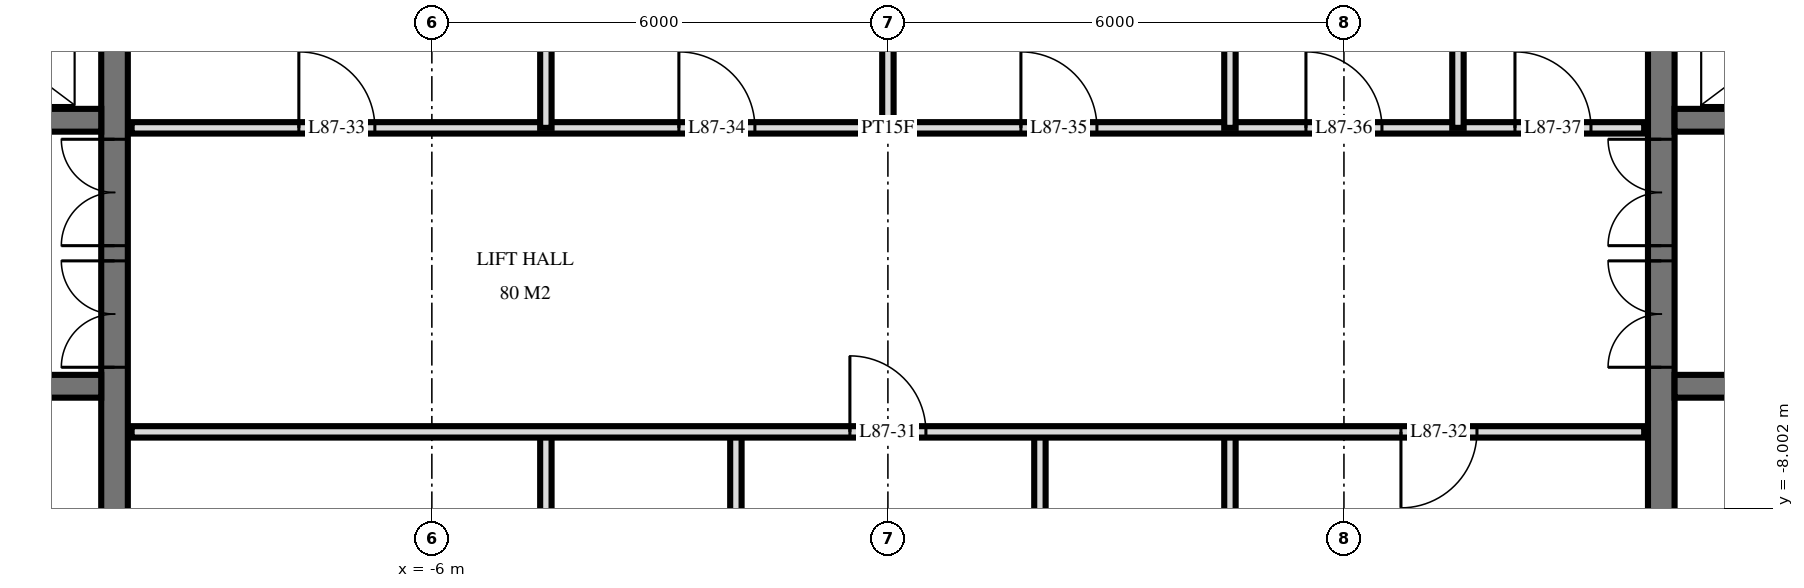
"""IFC4 building model, lengths in metres.
Left out: names, types, materials, properties, quantities, classifications, styles, units other than length and angle.
Written with IfcOpenShell. Run it as: python <this file> out.ifc"""

import sys

from ifc_helpers import new_model, si_unit, direction, frame, frame_2d, origin, place, context, subcontext, project, spatial, rectangle, extrude, element, fill, save


model = new_model("IFC4")
c1 = context("Model", 3, precision=1e-05, world=origin(), true_north=direction((0.0, 1.0)))
c2 = subcontext(c1, "Body", "Model", "MODEL_VIEW")
j1 = project(units=[si_unit("LENGTHUNIT", "METRE"), si_unit("PLANEANGLEUNIT", "RADIAN")], contexts=[c1])
p1 = place(None, origin())
s1 = spatial("IfcSite", under=j1, at=p1, CompositionType="ELEMENT")
p2 = place(p1, origin())
s2 = spatial("IfcBuilding", under=s1, at=p2, CompositionType="ELEMENT")
p3 = place(p2, frame((0.0, 0.0, 330.6)))
s3 = spatial("IfcBuildingStorey", under=s2, at=p3, CompositionType="ELEMENT", Elevation=330.6)
p4 = place(p3, frame((-10.175, -14.55, 0.0), z_axis=(0.0, 0.0, 1.0), x_axis=(0.0, 1.0, 0.0)))
e1 = element("IfcWall", 1, at=p4, inside=s3, PredefinedType="SHEAR", context=c2, shape_type="SweptSolid", body=[
    extrude(rectangle(XDim=14.1, YDim=0.35, at=frame_2d((7.05, 0.0))), origin(), (0.0, 0.0, 1.0), 4.0),
])
p5 = place(p4, frame((8.4, 0.0, 0.0)))
e2 = element("IfcOpeningElement", 2, at=p5, cuts=e1, PredefinedType="OPENING", context=c2, shape_type="SweptSolid", body=[
    extrude(rectangle(XDim=1.4, YDim=2.4, at=frame_2d((0.7, 1.2))), frame((0.0, 0.185, 0.0), z_axis=(0.0, -1.0, 0.0), x_axis=(1.0, 0.0, 0.0)), (0.0, 0.0, 1.0), 0.37),
])
p6 = place(p4, frame((10.0, 0.0, 0.0)))
e3 = element("IfcOpeningElement", 3, at=p6, cuts=e1, PredefinedType="OPENING", context=c2, shape_type="SweptSolid", body=[
    extrude(rectangle(XDim=1.4, YDim=2.4, at=frame_2d((0.7, 1.2))), frame((0.0, 0.185, 0.0), z_axis=(0.0, -1.0, 0.0), x_axis=(1.0, 0.0, 0.0)), (0.0, 0.0, 1.0), 0.37),
])
p7 = place(p4, frame((4.0, 0.0, 0.0)))
e4 = element("IfcOpeningElement", 4, at=p7, cuts=e1, PredefinedType="OPENING", context=c2, shape_type="SweptSolid", body=[
    extrude(rectangle(XDim=1.2, YDim=2.1, at=frame_2d((0.6, 1.05))), frame((0.0, 0.185, 0.0), z_axis=(0.0, -1.0, 0.0), x_axis=(1.0, 0.0, 0.0)), (0.0, 0.0, 1.0), 0.37),
])
p8 = place(p3, frame((-19.05, -2.9, 0.0), z_axis=(0.0, 0.0, 1.0), x_axis=(1.0, 0.0, 0.0)))
e5 = element("IfcWall", 5, at=p8, inside=s3, PredefinedType="SHEAR", context=c2, shape_type="SweptSolid", body=[
    extrude(rectangle(XDim=8.7, YDim=0.3, at=frame_2d((4.35, 0.0))), origin(), (0.0, 0.0, 1.0), 4.0),
])
p9 = place(p8, frame((6.8, 0.0, 0.0)))
e6 = element("IfcOpeningElement", 6, at=p9, cuts=e5, PredefinedType="OPENING", context=c2, shape_type="SweptSolid", body=[
    extrude(rectangle(XDim=1.1, YDim=2.1, at=frame_2d((0.55, 1.05))), frame((0.0, 0.16, 0.0), z_axis=(0.0, -1.0, 0.0), x_axis=(1.0, 0.0, 0.0)), (0.0, 0.0, 1.0), 0.32),
])
p10 = place(p8, frame((3.8, 0.0, 0.0)))
e7 = element("IfcOpeningElement", 7, at=p10, cuts=e5, PredefinedType="OPENING", context=c2, shape_type="SweptSolid", body=[
    extrude(rectangle(XDim=1.1, YDim=2.1, at=frame_2d((0.55, 1.05))), frame((0.0, 0.16, 0.0), z_axis=(0.0, -1.0, 0.0), x_axis=(1.0, 0.0, 0.0)), (0.0, 0.0, 1.0), 0.32),
])
p11 = place(p8, frame((1.613, 0.0, 0.0)))
e8 = element("IfcOpeningElement", 8, at=p11, cuts=e5, PredefinedType="OPENING", context=c2, shape_type="SweptSolid", body=[
    extrude(rectangle(XDim=0.9, YDim=2.1, at=frame_2d((0.45, 1.05))), frame((0.0, 0.16, 0.0), z_axis=(0.0, -1.0, 0.0), x_axis=(1.0, 0.0, 0.0)), (0.0, 0.0, 1.0), 0.32),
])
p12 = place(p8, frame((0.188, 0.0, 0.0)))
e9 = element("IfcOpeningElement", 9, at=p12, cuts=e5, PredefinedType="OPENING", context=c2, shape_type="SweptSolid", body=[
    extrude(rectangle(XDim=0.9, YDim=2.1, at=frame_2d((0.45, 1.05))), frame((0.0, 0.16, 0.0), z_axis=(0.0, -1.0, 0.0), x_axis=(1.0, 0.0, 0.0)), (0.0, 0.0, 1.0), 0.32),
])
p13 = place(p3, frame((-19.05, -6.4, 0.0), z_axis=(0.0, 0.0, 1.0), x_axis=(1.0, 0.0, 0.0)))
e10 = element("IfcWall", 10, at=p13, inside=s3, PredefinedType="SHEAR", context=c2, shape_type="SweptSolid", body=[
    extrude(rectangle(XDim=8.7, YDim=0.3, at=frame_2d((4.35, 0.0))), origin(), (0.0, 0.0, 1.0), 4.0),
])
p14 = place(p13, frame((0.8, 0.0, 0.0)))
e11 = element("IfcOpeningElement", 11, at=p14, cuts=e10, PredefinedType="OPENING", context=c2, shape_type="SweptSolid", body=[
    extrude(rectangle(XDim=1.1, YDim=2.1, at=frame_2d((0.55, 1.05))), frame((0.0, 0.16, 0.0), z_axis=(0.0, -1.0, 0.0), x_axis=(1.0, 0.0, 0.0)), (0.0, 0.0, 1.0), 0.32),
])
p15 = place(p3, frame((10.175, -14.55, 0.0), z_axis=(0.0, 0.0, 1.0), x_axis=(0.0, 1.0, 0.0)))
e12 = element("IfcWall", 12, at=p15, inside=s3, PredefinedType="SHEAR", context=c2, shape_type="SweptSolid", body=[
    extrude(rectangle(XDim=14.1, YDim=0.35, at=frame_2d((7.05, 0.0))), origin(), (0.0, 0.0, 1.0), 4.0),
])
p16 = place(p15, frame((8.4, 0.0, 0.0)))
e13 = element("IfcOpeningElement", 13, at=p16, cuts=e12, PredefinedType="OPENING", context=c2, shape_type="SweptSolid", body=[
    extrude(rectangle(XDim=1.4, YDim=2.4, at=frame_2d((0.7, 1.2))), frame((0.0, 0.185, 0.0), z_axis=(0.0, -1.0, 0.0), x_axis=(1.0, 0.0, 0.0)), (0.0, 0.0, 1.0), 0.37),
])
p17 = place(p15, frame((10.0, 0.0, 0.0)))
e14 = element("IfcOpeningElement", 14, at=p17, cuts=e12, PredefinedType="OPENING", context=c2, shape_type="SweptSolid", body=[
    extrude(rectangle(XDim=1.4, YDim=2.4, at=frame_2d((0.7, 1.2))), frame((0.0, 0.185, 0.0), z_axis=(0.0, -1.0, 0.0), x_axis=(1.0, 0.0, 0.0)), (0.0, 0.0, 1.0), 0.37),
])
p18 = place(p15, frame((4.0, 0.0, 0.0)))
e15 = element("IfcOpeningElement", 15, at=p18, cuts=e12, PredefinedType="OPENING", context=c2, shape_type="SweptSolid", body=[
    extrude(rectangle(XDim=1.2, YDim=2.1, at=frame_2d((0.6, 1.05))), frame((0.0, 0.185, 0.0), z_axis=(0.0, -1.0, 0.0), x_axis=(1.0, 0.0, 0.0)), (0.0, 0.0, 1.0), 0.37),
])
p19 = place(p3, frame((10.35, -2.9, 0.0), z_axis=(0.0, 0.0, 1.0), x_axis=(1.0, 0.0, 0.0)))
e16 = element("IfcWall", 16, at=p19, inside=s3, PredefinedType="SHEAR", context=c2, shape_type="SweptSolid", body=[
    extrude(rectangle(XDim=8.7, YDim=0.3, at=frame_2d((4.35, 0.0))), origin(), (0.0, 0.0, 1.0), 4.0),
])
p20 = place(p19, frame((0.8, 0.0, 0.0)))
e17 = element("IfcOpeningElement", 17, at=p20, cuts=e16, PredefinedType="OPENING", context=c2, shape_type="SweptSolid", body=[
    extrude(rectangle(XDim=1.1, YDim=2.1, at=frame_2d((0.55, 1.05))), frame((0.0, 0.16, 0.0), z_axis=(0.0, -1.0, 0.0), x_axis=(1.0, 0.0, 0.0)), (0.0, 0.0, 1.0), 0.32),
])
p21 = place(p19, frame((3.8, 0.0, 0.0)))
e18 = element("IfcOpeningElement", 18, at=p21, cuts=e16, PredefinedType="OPENING", context=c2, shape_type="SweptSolid", body=[
    extrude(rectangle(XDim=1.1, YDim=2.1, at=frame_2d((0.55, 1.05))), frame((0.0, 0.16, 0.0), z_axis=(0.0, -1.0, 0.0), x_axis=(1.0, 0.0, 0.0)), (0.0, 0.0, 1.0), 0.32),
])
p22 = place(p19, frame((6.188, 0.0, 0.0)))
e19 = element("IfcOpeningElement", 19, at=p22, cuts=e16, PredefinedType="OPENING", context=c2, shape_type="SweptSolid", body=[
    extrude(rectangle(XDim=0.9, YDim=2.1, at=frame_2d((0.45, 1.05))), frame((0.0, 0.16, 0.0), z_axis=(0.0, -1.0, 0.0), x_axis=(1.0, 0.0, 0.0)), (0.0, 0.0, 1.0), 0.32),
])
p23 = place(p19, frame((7.613, 0.0, 0.0)))
e20 = element("IfcOpeningElement", 20, at=p23, cuts=e16, PredefinedType="OPENING", context=c2, shape_type="SweptSolid", body=[
    extrude(rectangle(XDim=0.9, YDim=2.1, at=frame_2d((0.45, 1.05))), frame((0.0, 0.16, 0.0), z_axis=(0.0, -1.0, 0.0), x_axis=(1.0, 0.0, 0.0)), (0.0, 0.0, 1.0), 0.32),
])
p24 = place(p3, frame((10.35, -6.4, 0.0), z_axis=(0.0, 0.0, 1.0), x_axis=(1.0, 0.0, 0.0)))
e21 = element("IfcWall", 21, at=p24, inside=s3, PredefinedType="SHEAR", context=c2, shape_type="SweptSolid", body=[
    extrude(rectangle(XDim=8.7, YDim=0.3, at=frame_2d((4.35, 0.0))), origin(), (0.0, 0.0, 1.0), 4.0),
])
p25 = place(p24, frame((6.8, 0.0, 0.0)))
e22 = element("IfcOpeningElement", 22, at=p25, cuts=e21, PredefinedType="OPENING", context=c2, shape_type="SweptSolid", body=[
    extrude(rectangle(XDim=1.1, YDim=2.1, at=frame_2d((0.55, 1.05))), frame((0.0, 0.16, 0.0), z_axis=(0.0, -1.0, 0.0), x_axis=(1.0, 0.0, 0.0)), (0.0, 0.0, 1.0), 0.32),
])
p26 = place(p3, frame((7.5, -3.0, 0.0), z_axis=(0.0, 0.0, 1.0), x_axis=(0.0, 1.0, 0.0)))
e23 = element("IfcWall", 23, at=p26, inside=s3, PredefinedType="PLUMBINGWALL", context=c2, shape_type="SweptSolid", body=[
    extrude(rectangle(XDim=7.445, YDim=0.15, at=frame_2d((3.723, 0.0))), origin(), (0.0, 0.0, 1.0), 3.72),
])
p27 = place(p3, frame((4.5, -11.0, 0.0), z_axis=(0.0, 0.0, 1.0), x_axis=(0.0, 1.0, 0.0)))
e24 = element("IfcWall", 24, at=p27, inside=s3, PredefinedType="PARTITIONING", context=c2, shape_type="SweptSolid", body=[
    extrude(rectangle(XDim=4.0, YDim=0.15, at=frame_2d((2.0, 0.0))), origin(), (0.0, 0.0, 1.0), 3.72),
])
p28 = place(p3, frame((4.5, -3.0, 0.0), z_axis=(0.0, 0.0, 1.0), x_axis=(0.0, 1.0, 0.0)))
e25 = element("IfcWall", 25, at=p28, inside=s3, PredefinedType="PLUMBINGWALL", context=c2, shape_type="SweptSolid", body=[
    extrude(rectangle(XDim=7.077, YDim=0.15, at=frame_2d((3.539, 0.0))), origin(), (0.0, 0.0, 1.0), 3.72),
])
p29 = place(p3, frame((2.0, -11.0, 0.0), z_axis=(0.0, 0.0, 1.0), x_axis=(0.0, 1.0, 0.0)))
e26 = element("IfcWall", 26, at=p29, inside=s3, PredefinedType="PARTITIONING", context=c2, shape_type="SweptSolid", body=[
    extrude(rectangle(XDim=4.0, YDim=0.15, at=frame_2d((2.0, 0.0))), origin(), (0.0, 0.0, 1.0), 3.72),
])
p30 = place(p29, frame((1.5, 0.0, 0.0)))
e27 = element("IfcOpeningElement", 27, at=p30, cuts=e26, PredefinedType="OPENING", context=c2, shape_type="SweptSolid", body=[
    extrude(rectangle(XDim=1.0, YDim=2.1, at=frame_2d((0.5, 1.05))), frame((0.0, 0.085, 0.0), z_axis=(0.0, -1.0, 0.0), x_axis=(1.0, 0.0, 0.0)), (0.0, 0.0, 1.0), 0.17),
])
p31 = place(p3, frame((0.0, -3.0, 0.0), z_axis=(0.0, 0.0, 1.0), x_axis=(0.0, 1.0, 0.0)))
e28 = element("IfcWall", 28, at=p31, inside=s3, PredefinedType="PARTITIONING", context=c2, shape_type="SweptSolid", body=[
    extrude(rectangle(XDim=6.524, YDim=0.15, at=frame_2d((3.262, 0.0))), origin(), (0.0, 0.0, 1.0), 3.72),
])
p32 = place(p3, frame((-2.0, -11.0, 0.0), z_axis=(0.0, 0.0, 1.0), x_axis=(0.0, 1.0, 0.0)))
e29 = element("IfcWall", 29, at=p32, inside=s3, PredefinedType="PARTITIONING", context=c2, shape_type="SweptSolid", body=[
    extrude(rectangle(XDim=4.0, YDim=0.15, at=frame_2d((2.0, 0.0))), origin(), (0.0, 0.0, 1.0), 3.72),
])
p33 = place(p32, frame((1.5, 0.0, 0.0)))
e30 = element("IfcOpeningElement", 30, at=p33, cuts=e29, PredefinedType="OPENING", context=c2, shape_type="SweptSolid", body=[
    extrude(rectangle(XDim=1.0, YDim=2.1, at=frame_2d((0.5, 1.05))), frame((0.0, 0.085, 0.0), z_axis=(0.0, -1.0, 0.0), x_axis=(1.0, 0.0, 0.0)), (0.0, 0.0, 1.0), 0.17),
])
p34 = place(p3, frame((-4.5, -11.0, 0.0), z_axis=(0.0, 0.0, 1.0), x_axis=(0.0, 1.0, 0.0)))
e31 = element("IfcWall", 31, at=p34, inside=s3, PredefinedType="PARTITIONING", context=c2, shape_type="SweptSolid", body=[
    extrude(rectangle(XDim=4.0, YDim=0.15, at=frame_2d((2.0, 0.0))), origin(), (0.0, 0.0, 1.0), 3.72),
])
p35 = place(p3, frame((-4.5, -3.0, 0.0), z_axis=(0.0, 0.0, 1.0), x_axis=(0.0, 1.0, 0.0)))
e32 = element("IfcWall", 32, at=p35, inside=s3, PredefinedType="PARTITIONING", context=c2, shape_type="SweptSolid", body=[
    extrude(rectangle(XDim=5.972, YDim=0.15, at=frame_2d((2.986, 0.0))), origin(), (0.0, 0.0, 1.0), 3.72),
])
p36 = place(p3, frame((-9.95, -7.0, 0.0), z_axis=(0.0, 0.0, 1.0), x_axis=(1.0, 0.0, 0.0)))
e33 = element("IfcWall", 33, at=p36, inside=s3, PredefinedType="PARTITIONING", context=c2, shape_type="SweptSolid", body=[
    extrude(rectangle(XDim=19.9, YDim=0.15, at=frame_2d((9.95, 0.0))), origin(), (0.0, 0.0, 1.0), 3.72),
])
p37 = place(p36, frame((9.45, 0.0, 0.0)))
e34 = element("IfcOpeningElement", 34, at=p37, cuts=e33, PredefinedType="OPENING", context=c2, shape_type="SweptSolid", body=[
    extrude(rectangle(XDim=1.0, YDim=2.1, at=frame_2d((0.5, 1.05))), frame((0.0, 0.085, 0.0), z_axis=(0.0, -1.0, 0.0), x_axis=(1.0, 0.0, 0.0)), (0.0, 0.0, 1.0), 0.17),
])
p38 = place(p36, frame((16.7, 0.0, 0.0)))
e35 = element("IfcOpeningElement", 35, at=p38, cuts=e33, PredefinedType="OPENING", context=c2, shape_type="SweptSolid", body=[
    extrude(rectangle(XDim=1.0, YDim=2.1, at=frame_2d((0.5, 1.05))), frame((0.0, 0.085, 0.0), z_axis=(0.0, -1.0, 0.0), x_axis=(1.0, 0.0, 0.0)), (0.0, 0.0, 1.0), 0.17),
])
p39 = place(p3, frame((-9.95, -3.0, 0.0), z_axis=(0.0, 0.0, 1.0), x_axis=(1.0, 0.0, 0.0)))
e36 = element("IfcWall", 36, at=p39, inside=s3, PredefinedType="PARTITIONING", context=c2, shape_type="SweptSolid", body=[
    extrude(rectangle(XDim=19.9, YDim=0.15, at=frame_2d((9.95, 0.0))), origin(), (0.0, 0.0, 1.0), 3.72),
])
p40 = place(p39, frame((2.2, 0.0, 0.0)))
e37 = element("IfcOpeningElement", 37, at=p40, cuts=e36, PredefinedType="OPENING", context=c2, shape_type="SweptSolid", body=[
    extrude(rectangle(XDim=1.0, YDim=2.1, at=frame_2d((0.5, 1.05))), frame((0.0, 0.085, 0.0), z_axis=(0.0, -1.0, 0.0), x_axis=(1.0, 0.0, 0.0)), (0.0, 0.0, 1.0), 0.17),
])
p41 = place(p39, frame((7.2, 0.0, 0.0)))
e38 = element("IfcOpeningElement", 38, at=p41, cuts=e36, PredefinedType="OPENING", context=c2, shape_type="SweptSolid", body=[
    extrude(rectangle(XDim=1.0, YDim=2.1, at=frame_2d((0.5, 1.05))), frame((0.0, 0.085, 0.0), z_axis=(0.0, -1.0, 0.0), x_axis=(1.0, 0.0, 0.0)), (0.0, 0.0, 1.0), 0.17),
])
p42 = place(p39, frame((11.7, 0.0, 0.0)))
e39 = element("IfcOpeningElement", 39, at=p42, cuts=e36, PredefinedType="OPENING", context=c2, shape_type="SweptSolid", body=[
    extrude(rectangle(XDim=1.0, YDim=2.1, at=frame_2d((0.5, 1.05))), frame((0.0, 0.085, 0.0), z_axis=(0.0, -1.0, 0.0), x_axis=(1.0, 0.0, 0.0)), (0.0, 0.0, 1.0), 0.17),
])
p43 = place(p39, frame((15.45, 0.0, 0.0)))
e40 = element("IfcOpeningElement", 40, at=p43, cuts=e36, PredefinedType="OPENING", context=c2, shape_type="SweptSolid", body=[
    extrude(rectangle(XDim=1.0, YDim=2.1, at=frame_2d((0.5, 1.05))), frame((0.0, 0.085, 0.0), z_axis=(0.0, -1.0, 0.0), x_axis=(1.0, 0.0, 0.0)), (0.0, 0.0, 1.0), 0.17),
])
p44 = place(p39, frame((18.2, 0.0, 0.0)))
e41 = element("IfcOpeningElement", 41, at=p44, cuts=e36, PredefinedType="OPENING", context=c2, shape_type="SweptSolid", body=[
    extrude(rectangle(XDim=1.0, YDim=2.1, at=frame_2d((0.5, 1.05))), frame((0.0, 0.085, 0.0), z_axis=(0.0, -1.0, 0.0), x_axis=(1.0, 0.0, 0.0)), (0.0, 0.0, 1.0), 0.17),
])
p45 = place(p5, origin())
e42 = element("IfcDoor", 42, at=p45, inside=s3, OperationType="DOUBLE_DOOR_SINGLE_SWING", PredefinedType="DOOR", context=c2, shape_type="SweptSolid", body=[
    extrude(rectangle(XDim=1.4, YDim=2.4, at=frame_2d((0.7, 1.2))), frame((0.0, 0.025, 0.0), z_axis=(0.0, -1.0, 0.0), x_axis=(1.0, 0.0, 0.0)), (0.0, 0.0, 1.0), 0.05),
])
fill(e2, e42)
p46 = place(p6, origin())
e43 = element("IfcDoor", 43, at=p46, inside=s3, OperationType="DOUBLE_DOOR_SINGLE_SWING", PredefinedType="DOOR", context=c2, shape_type="SweptSolid", body=[
    extrude(rectangle(XDim=1.4, YDim=2.4, at=frame_2d((0.7, 1.2))), frame((0.0, 0.025, 0.0), z_axis=(0.0, -1.0, 0.0), x_axis=(1.0, 0.0, 0.0)), (0.0, 0.0, 1.0), 0.05),
])
fill(e3, e43)
p47 = place(p16, origin())
e44 = element("IfcDoor", 44, at=p47, inside=s3, OperationType="DOUBLE_DOOR_SINGLE_SWING", PredefinedType="DOOR", context=c2, shape_type="SweptSolid", body=[
    extrude(rectangle(XDim=1.4, YDim=2.4, at=frame_2d((0.7, 1.2))), frame((0.0, 0.025, 0.0), z_axis=(0.0, -1.0, 0.0), x_axis=(1.0, 0.0, 0.0)), (0.0, 0.0, 1.0), 0.05),
])
fill(e13, e44)
p48 = place(p17, origin())
e45 = element("IfcDoor", 45, at=p48, inside=s3, OperationType="DOUBLE_DOOR_SINGLE_SWING", PredefinedType="DOOR", context=c2, shape_type="SweptSolid", body=[
    extrude(rectangle(XDim=1.4, YDim=2.4, at=frame_2d((0.7, 1.2))), frame((0.0, 0.025, 0.0), z_axis=(0.0, -1.0, 0.0), x_axis=(1.0, 0.0, 0.0)), (0.0, 0.0, 1.0), 0.05),
])
fill(e14, e45)
p49 = place(p37, origin())
e46 = element("IfcDoor", 46, at=p49, inside=s3, OperationType="SINGLE_SWING_RIGHT", PredefinedType="DOOR", context=c2, shape_type="SweptSolid", body=[
    extrude(rectangle(XDim=1.0, YDim=2.1, at=frame_2d((0.5, 1.05))), frame((0.0, 0.025, 0.0), z_axis=(0.0, -1.0, 0.0), x_axis=(1.0, 0.0, 0.0)), (0.0, 0.0, 1.0), 0.05),
])
fill(e34, e46)
p50 = place(p38, frame((0.5, 0.0, 0.0), z_axis=(0.0, 0.0, 1.0), x_axis=(-1.0, 0.0, 0.0)))
e47 = element("IfcDoor", 47, at=p50, inside=s3, OperationType="SINGLE_SWING_LEFT", PredefinedType="DOOR", context=c2, shape_type="SweptSolid", body=[
    extrude(rectangle(XDim=1.0, YDim=2.1, at=frame_2d((0.0, 1.05))), frame((0.0, -0.025, 0.0), z_axis=(0.0, 1.0, 0.0), x_axis=(-1.0, 0.0, 0.0)), (0.0, 0.0, 1.0), 0.05),
])
fill(e35, e47)
p51 = place(p40, origin())
e48 = element("IfcDoor", 48, at=p51, inside=s3, OperationType="SINGLE_SWING_RIGHT", PredefinedType="DOOR", context=c2, shape_type="SweptSolid", body=[
    extrude(rectangle(XDim=1.0, YDim=2.1, at=frame_2d((0.5, 1.05))), frame((0.0, 0.025, 0.0), z_axis=(0.0, -1.0, 0.0), x_axis=(1.0, 0.0, 0.0)), (0.0, 0.0, 1.0), 0.05),
])
fill(e37, e48)
p52 = place(p41, origin())
e49 = element("IfcDoor", 49, at=p52, inside=s3, OperationType="SINGLE_SWING_RIGHT", PredefinedType="DOOR", context=c2, shape_type="SweptSolid", body=[
    extrude(rectangle(XDim=1.0, YDim=2.1, at=frame_2d((0.5, 1.05))), frame((0.0, 0.025, 0.0), z_axis=(0.0, -1.0, 0.0), x_axis=(1.0, 0.0, 0.0)), (0.0, 0.0, 1.0), 0.05),
])
fill(e38, e49)
p53 = place(p42, origin())
e50 = element("IfcDoor", 50, at=p53, inside=s3, OperationType="SINGLE_SWING_RIGHT", PredefinedType="DOOR", context=c2, shape_type="SweptSolid", body=[
    extrude(rectangle(XDim=1.0, YDim=2.1, at=frame_2d((0.5, 1.05))), frame((0.0, 0.025, 0.0), z_axis=(0.0, -1.0, 0.0), x_axis=(1.0, 0.0, 0.0)), (0.0, 0.0, 1.0), 0.05),
])
fill(e39, e50)
p54 = place(p43, origin())
e51 = element("IfcDoor", 51, at=p54, inside=s3, OperationType="SINGLE_SWING_RIGHT", PredefinedType="DOOR", context=c2, shape_type="SweptSolid", body=[
    extrude(rectangle(XDim=1.0, YDim=2.1, at=frame_2d((0.5, 1.05))), frame((0.0, 0.025, 0.0), z_axis=(0.0, -1.0, 0.0), x_axis=(1.0, 0.0, 0.0)), (0.0, 0.0, 1.0), 0.05),
])
fill(e40, e51)
p55 = place(p44, origin())
e52 = element("IfcDoor", 52, at=p55, inside=s3, OperationType="SINGLE_SWING_RIGHT", PredefinedType="DOOR", context=c2, shape_type="SweptSolid", body=[
    extrude(rectangle(XDim=1.0, YDim=2.1, at=frame_2d((0.5, 1.05))), frame((0.0, 0.025, 0.0), z_axis=(0.0, -1.0, 0.0), x_axis=(1.0, 0.0, 0.0)), (0.0, 0.0, 1.0), 0.05),
])
fill(e41, e52)
save(model, sys.argv[1])
